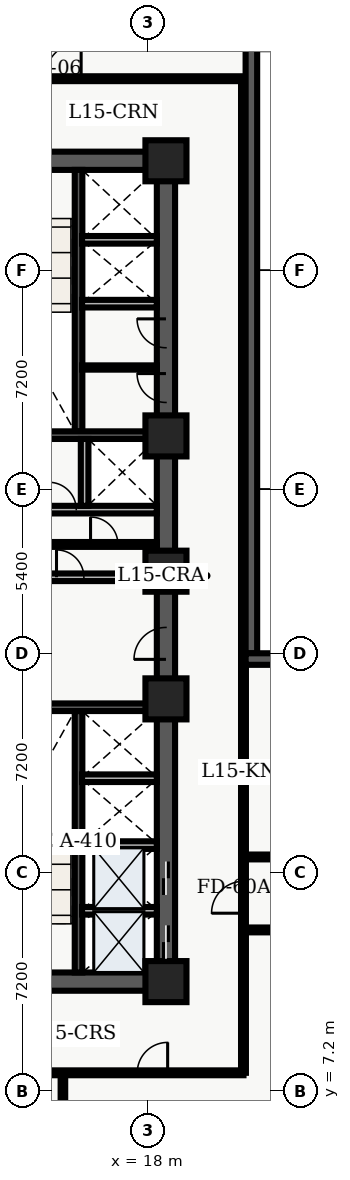
"""IFC4 building model, lengths in metres.
Left out: names, types, materials, properties, quantities, classifications, styles, units other than length and angle.
Written with IfcOpenShell. Run it as: python <this file> out.ifc"""

import sys

from ifc_helpers import new_model, entity, si_unit, converted_unit, direction, frame, origin_with_axes, origin_2d_with_axis, place, context, subcontext, project, spatial, polyline, rectangle, outline, extrude, element, fill, save


model = new_model("IFC4")
c1 = context("Model", 3, precision=1e-05, world=origin_with_axes(), true_north=direction((0.0, 1.0)))
c2 = subcontext(c1, "Body", "Model", "MODEL_VIEW")
j1 = project(units=[si_unit("LENGTHUNIT", "METRE"), converted_unit("PLANEANGLEUNIT", "DEGREE", entity("IfcPlaneAngleMeasure", 0.017), si_unit("PLANEANGLEUNIT", "RADIAN"), dimensions=[0, 0, 0, 0, 0, 0, 0])], contexts=[c1])
p1 = place(None, origin_with_axes())
s1 = spatial("IfcSite", under=j1, at=p1, CompositionType="ELEMENT")
p2 = place(p1, origin_with_axes())
s2 = spatial("IfcBuilding", under=s1, at=p2, CompositionType="ELEMENT")
p3 = place(p2, frame((0.0, 0.0, 63.9), z_axis=(0.0, 0.0, 1.0), x_axis=(1.0, 0.0, 0.0)))
s3 = spatial("IfcBuildingStorey", under=s2, at=p3, CompositionType="ELEMENT", Elevation=63.9)
p4 = place(p3, frame((11.4, 10.8, 0.0), z_axis=(0.0, 0.0, 1.0), x_axis=(1.0, 0.0, 0.0)))
e1 = element("IfcWall", 1, at=p4, inside=s3, PredefinedType="SHEAR", context=c2, shape_type="SweptSolid", body=[
    extrude(outline(polyline([(0.0, -0.3), (7.2, -0.3), (7.2, 0.3), (0.0, 0.3), (0.0, -0.3)])), origin_with_axes(), (0.0, 0.0, 1.0), 3.66),
])
p5 = place(p4, frame((2.625, 0.0, 0.0), z_axis=(0.0, 0.0, 1.0), x_axis=(1.0, 0.0, 0.0)))
e2 = element("IfcOpeningElement", 2, at=p5, cuts=e1, PredefinedType="OPENING", context=c2, shape_type="SweptSolid", body=[
    extrude(rectangle(XDim=1.05, YDim=0.62, at=origin_2d_with_axis()), origin_with_axes(), (0.0, 0.0, 1.0), 2.15),
])
p6 = place(p3, frame((11.4, 37.8, 0.0), z_axis=(0.0, 0.0, 1.0), x_axis=(1.0, 0.0, 0.0)))
e3 = element("IfcWall", 3, at=p6, inside=s3, PredefinedType="SHEAR", context=c2, shape_type="SweptSolid", body=[
    extrude(outline(polyline([(0.0, -0.3), (7.2, -0.3), (7.2, 0.3), (0.0, 0.3), (0.0, -0.3)])), origin_with_axes(), (0.0, 0.0, 1.0), 3.66),
])
p7 = place(p6, frame((2.625, 0.0, 0.0), z_axis=(0.0, 0.0, 1.0), x_axis=(1.0, 0.0, 0.0)))
e4 = element("IfcOpeningElement", 4, at=p7, cuts=e3, PredefinedType="OPENING", context=c2, shape_type="SweptSolid", body=[
    extrude(rectangle(XDim=1.05, YDim=0.62, at=origin_2d_with_axis()), origin_with_axes(), (0.0, 0.0, 1.0), 2.15),
])
p8 = place(p3, frame((18.6, 10.8, 0.0), z_axis=(0.0, 0.0, 1.0), x_axis=(0.0, 1.0, 0.0)))
e5 = element("IfcWall", 5, at=p8, inside=s3, PredefinedType="SHEAR", context=c2, shape_type="SweptSolid", body=[
    extrude(outline(polyline([(0.0, -0.3), (13.5, -0.3), (13.5, 0.3), (0.0, 0.3), (0.0, -0.3)])), origin_with_axes(), (0.0, 0.0, 1.0), 3.66),
])
p9 = place(p8, frame((1.3, 0.0, 0.0), z_axis=(0.0, 0.0, 1.0), x_axis=(1.0, 0.0, 0.0)))
e6 = element("IfcOpeningElement", 6, at=p9, cuts=e5, PredefinedType="OPENING", context=c2, shape_type="SweptSolid", body=[
    extrude(rectangle(XDim=1.1, YDim=0.62, at=origin_2d_with_axis()), origin_with_axes(), (0.0, 0.0, 1.0), 2.15),
])
p10 = place(p8, frame((3.4, 0.0, 0.0), z_axis=(0.0, 0.0, 1.0), x_axis=(1.0, 0.0, 0.0)))
e7 = element("IfcOpeningElement", 7, at=p10, cuts=e5, PredefinedType="OPENING", context=c2, shape_type="SweptSolid", body=[
    extrude(rectangle(XDim=1.1, YDim=0.62, at=origin_2d_with_axis()), origin_with_axes(), (0.0, 0.0, 1.0), 2.15),
])
p11 = place(p8, frame((11.125, 0.0, 0.0), z_axis=(0.0, 0.0, 1.0), x_axis=(1.0, 0.0, 0.0)))
e8 = element("IfcOpeningElement", 8, at=p11, cuts=e5, PredefinedType="OPENING", context=c2, shape_type="SweptSolid", body=[
    extrude(rectangle(XDim=1.05, YDim=0.62, at=origin_2d_with_axis()), origin_with_axes(), (0.0, 0.0, 1.0), 2.15),
])
p12 = place(p3, frame((18.6, 24.3, 0.0), z_axis=(0.0, 0.0, 1.0), x_axis=(0.0, 1.0, 0.0)))
e9 = element("IfcWall", 9, at=p12, inside=s3, PredefinedType="SHEAR", context=c2, shape_type="SweptSolid", body=[
    extrude(outline(polyline([(0.0, -0.3), (13.5, -0.3), (13.5, 0.3), (0.0, 0.3), (0.0, -0.3)])), origin_with_axes(), (0.0, 0.0, 1.0), 3.66),
])
p13 = place(p12, frame((6.025, 0.0, 0.0), z_axis=(0.0, 0.0, 1.0), x_axis=(1.0, 0.0, 0.0)))
e10 = element("IfcOpeningElement", 10, at=p13, cuts=e9, PredefinedType="OPENING", context=c2, shape_type="SweptSolid", body=[
    extrude(rectangle(XDim=0.95, YDim=0.62, at=origin_2d_with_axis()), origin_with_axes(), (0.0, 0.0, 1.0), 2.15),
])
p14 = place(p12, frame((7.825, 0.0, 0.0), z_axis=(0.0, 0.0, 1.0), x_axis=(1.0, 0.0, 0.0)))
e11 = element("IfcOpeningElement", 11, at=p14, cuts=e9, PredefinedType="OPENING", context=c2, shape_type="SweptSolid", body=[
    extrude(rectangle(XDim=0.95, YDim=0.62, at=origin_2d_with_axis()), origin_with_axes(), (0.0, 0.0, 1.0), 2.15),
])
p15 = place(p3, frame((15.725, 11.1, 0.0), z_axis=(0.0, 0.0, 1.0), x_axis=(0.0, 1.0, 0.0)))
e12 = element("IfcWall", 12, at=p15, inside=s3, PredefinedType="SHEAR", context=c2, shape_type="SweptSolid", body=[
    extrude(outline(polyline([(0.0, -0.125), (8.6, -0.125), (8.6, 0.125), (0.0, 0.125), (0.0, -0.125)])), origin_with_axes(), (0.0, 0.0, 1.0), 3.66),
])
p16 = place(p3, frame((11.7, 19.825, 0.0), z_axis=(0.0, 0.0, 1.0), x_axis=(1.0, 0.0, 0.0)))
e13 = element("IfcWall", 13, at=p16, inside=s3, PredefinedType="SHEAR", context=c2, shape_type="SweptSolid", body=[
    extrude(outline(polyline([(0.0, -0.125), (6.6, -0.125), (6.6, 0.125), (0.0, 0.125), (0.0, -0.125)])), origin_with_axes(), (0.0, 0.0, 1.0), 3.66),
])
p17 = place(p3, frame((15.725, 28.9, 0.0), z_axis=(0.0, 0.0, 1.0), x_axis=(0.0, 1.0, 0.0)))
e14 = element("IfcWall", 14, at=p17, inside=s3, PredefinedType="SHEAR", context=c2, shape_type="SweptSolid", body=[
    extrude(outline(polyline([(0.0, -0.125), (8.6, -0.125), (8.6, 0.125), (0.0, 0.125), (0.0, -0.125)])), origin_with_axes(), (0.0, 0.0, 1.0), 3.66),
])
p18 = place(p3, frame((11.7, 28.775, 0.0), z_axis=(0.0, 0.0, 1.0), x_axis=(1.0, 0.0, 0.0)))
e15 = element("IfcWall", 15, at=p18, inside=s3, PredefinedType="SHEAR", context=c2, shape_type="SweptSolid", body=[
    extrude(outline(polyline([(0.0, -0.125), (6.6, -0.125), (6.6, 0.125), (0.0, 0.125), (0.0, -0.125)])), origin_with_axes(), (0.0, 0.0, 1.0), 3.66),
])
p19 = place(p3, frame((11.7, 24.1, 0.0), z_axis=(0.0, 0.0, 1.0), x_axis=(1.0, 0.0, 0.0)))
e16 = element("IfcWall", 16, at=p19, inside=s3, PredefinedType="SOLIDWALL", context=c2, shape_type="SweptSolid", body=[
    extrude(outline(polyline([(0.0, -0.125), (6.6, -0.125), (6.6, 0.125), (0.0, 0.125), (0.0, -0.125)])), origin_with_axes(), (0.0, 0.0, 1.0), 2.7),
])
p20 = place(p19, frame((3.75, 0.0, 0.0), z_axis=(0.0, 0.0, 1.0), x_axis=(1.0, 0.0, 0.0)))
e17 = element("IfcOpeningElement", 17, at=p20, cuts=e16, PredefinedType="OPENING", context=c2, shape_type="SweptSolid", body=[
    extrude(rectangle(XDim=0.9, YDim=0.27, at=origin_2d_with_axis()), origin_with_axes(), (0.0, 0.0, 1.0), 2.15),
])
p21 = place(p3, frame((11.7, 26.325, 0.0), z_axis=(0.0, 0.0, 1.0), x_axis=(1.0, 0.0, 0.0)))
e18 = element("IfcWall", 18, at=p21, inside=s3, PredefinedType="SOLIDWALL", context=c2, shape_type="SweptSolid", body=[
    extrude(outline(polyline([(0.0, -0.125), (6.6, -0.125), (6.6, 0.125), (0.0, 0.125), (0.0, -0.125)])), origin_with_axes(), (0.0, 0.0, 1.0), 2.7),
])
p22 = place(p21, frame((3.5, 0.0, 0.0), z_axis=(0.0, 0.0, 1.0), x_axis=(1.0, 0.0, 0.0)))
e19 = element("IfcOpeningElement", 19, at=p22, cuts=e18, PredefinedType="OPENING", context=c2, shape_type="SweptSolid", body=[
    extrude(rectangle(XDim=0.9, YDim=0.27, at=origin_2d_with_axis()), origin_with_axes(), (0.0, 0.0, 1.0), 2.15),
])
p23 = place(p3, frame((15.925, 26.45, 0.0), z_axis=(0.0, 0.0, 1.0), x_axis=(0.0, 1.0, 0.0)))
e20 = element("IfcWall", 20, at=p23, inside=s3, PredefinedType="SOLIDWALL", context=c2, shape_type="SweptSolid", body=[
    extrude(outline(polyline([(0.0, -0.125), (2.2, -0.125), (2.2, 0.125), (0.0, 0.125), (0.0, -0.125)])), origin_with_axes(), (0.0, 0.0, 1.0), 2.7),
])
for number, where, z_axis, x_axis in (
    (21, (18.6, 10.8, 0.0), (0.0, 0.0, 1.0), (1.0, 0.0, 0.0)),
    (22, (18.6, 20.1, 0.0), (0.0, 0.0, 1.0), (1.0, 0.0, 0.0)),
    (23, (18.6, 24.3, 0.0), (0.0, 0.0, 1.0), (1.0, 0.0, 0.0)),
    (24, (18.6, 28.75, 0.0), (0.0, 0.0, 1.0), (1.0, 0.0, 0.0)),
    (25, (18.6, 37.8, 0.0), (0.0, 0.0, 1.0), (1.0, 0.0, 0.0)),
):
    element("IfcColumn", number, at=place(p3, frame(where, z_axis=z_axis, x_axis=x_axis)), inside=s3, PredefinedType="COLUMN", context=c2, shape_type="SweptSolid", body=[
        extrude(rectangle(XDim=1.35, YDim=1.35, at=origin_2d_with_axis()), origin_with_axes(), (0.0, 0.0, 1.0), 3.9),
    ])
p24 = place(p3, frame((14.62, 25.18, 0.0), z_axis=(0.0, 0.0, 1.0), x_axis=(1.0, 0.0, 0.0)))
e26 = element("IfcWall", 26, at=p24, inside=s3, PredefinedType="PARTITIONING", context=c2, shape_type="SweptSolid", body=[
    extrude(outline(polyline([(0.0, -0.08), (3.68, -0.08), (3.68, 0.08), (0.0, 0.08), (0.0, -0.08)])), origin_with_axes(), (0.0, 0.0, 1.0), 2.7),
])
p25 = place(p24, frame((1.95, 0.0, 0.0), z_axis=(0.0, 0.0, 1.0), x_axis=(1.0, 0.0, 0.0)))
e27 = element("IfcOpeningElement", 27, at=p25, cuts=e26, PredefinedType="OPENING", context=c2, shape_type="SweptSolid", body=[
    extrude(rectangle(XDim=0.9, YDim=0.18, at=origin_2d_with_axis()), origin_with_axes(), (0.0, 0.0, 1.0), 2.15),
])
for number, where, z_axis, x_axis in (
    (28, (15.84, 13.13, 0.0), (0.0, 0.0, 1.0), (1.0, 0.0, 0.0)),
    (29, (15.84, 15.29, 0.0), (0.0, 0.0, 1.0), (1.0, 0.0, 0.0)),
    (30, (15.84, 17.49, 0.0), (0.0, 0.0, 1.0), (1.0, 0.0, 0.0)),
    (31, (15.84, 33.1, 0.0), (0.0, 0.0, 1.0), (1.0, 0.0, 0.0)),
    (32, (15.84, 35.2, 0.0), (0.0, 0.0, 1.0), (1.0, 0.0, 0.0)),
):
    element("IfcWall", number, at=place(p3, frame(where, z_axis=z_axis, x_axis=x_axis)), inside=s3, PredefinedType="SOLIDWALL", context=c2, shape_type="SweptSolid", body=[
        extrude(outline(polyline([(0.0, -0.125), (2.46, -0.125), (2.46, 0.125), (0.0, 0.125), (0.0, -0.125)])), origin_with_axes(), (0.0, 0.0, 1.0), 2.7),
    ])
p26 = place(p3, frame((15.84, 31.0, 0.0), z_axis=(0.0, 0.0, 1.0), x_axis=(1.0, 0.0, 0.0)))
e33 = element("IfcWall", 33, at=p26, inside=s3, PredefinedType="PARTITIONING", context=c2, shape_type="SweptSolid", body=[
    extrude(outline(polyline([(0.0, -0.07), (2.46, -0.07), (2.46, 0.07), (0.0, 0.07), (0.0, -0.07)])), origin_with_axes(), (0.0, 0.0, 1.0), 2.7),
])
p27 = place(p3, frame((2.6, 7.8, 0.0), z_axis=(0.0, 0.0, 1.0), x_axis=(1.0, 0.0, 0.0)))
e34 = element("IfcWall", 34, at=p27, inside=s3, PredefinedType="PARTITIONING", context=c2, shape_type="SweptSolid", body=[
    extrude(outline(polyline([(0.0, -0.08), (18.55, -0.08), (18.55, 0.08), (0.0, 0.08), (0.0, -0.08)])), origin_with_axes(), (0.0, 0.0, 1.0), 2.7),
])
p28 = place(p27, frame((1.825, 0.0, 0.0), z_axis=(0.0, 0.0, 1.0), x_axis=(1.0, 0.0, 0.0)))
e35 = element("IfcOpeningElement", 35, at=p28, cuts=e34, PredefinedType="OPENING", context=c2, shape_type="SweptSolid", body=[
    extrude(rectangle(XDim=1.0, YDim=0.18, at=origin_2d_with_axis()), origin_with_axes(), (0.0, 0.0, 1.0), 2.15),
])
p29 = place(p27, frame((6.229, 0.0, 0.0), z_axis=(0.0, 0.0, 1.0), x_axis=(1.0, 0.0, 0.0)))
e36 = element("IfcOpeningElement", 36, at=p29, cuts=e34, PredefinedType="OPENING", context=c2, shape_type="SweptSolid", body=[
    extrude(rectangle(XDim=1.0, YDim=0.18, at=origin_2d_with_axis()), origin_with_axes(), (0.0, 0.0, 1.0), 2.15),
])
p30 = place(p27, frame((10.706, 0.0, 0.0), z_axis=(0.0, 0.0, 1.0), x_axis=(1.0, 0.0, 0.0)))
e37 = element("IfcOpeningElement", 37, at=p30, cuts=e34, PredefinedType="OPENING", context=c2, shape_type="SweptSolid", body=[
    extrude(rectangle(XDim=1.0, YDim=0.18, at=origin_2d_with_axis()), origin_with_axes(), (0.0, 0.0, 1.0), 2.15),
])
p31 = place(p27, frame((15.556, 0.0, 0.0), z_axis=(0.0, 0.0, 1.0), x_axis=(1.0, 0.0, 0.0)))
e38 = element("IfcOpeningElement", 38, at=p31, cuts=e34, PredefinedType="OPENING", context=c2, shape_type="SweptSolid", body=[
    extrude(rectangle(XDim=1.0, YDim=0.18, at=origin_2d_with_axis()), origin_with_axes(), (0.0, 0.0, 1.0), 2.15),
])
p32 = place(p3, frame((2.6, 40.5, 0.0), z_axis=(0.0, 0.0, 1.0), x_axis=(1.0, 0.0, 0.0)))
e39 = element("IfcWall", 39, at=p32, inside=s3, PredefinedType="PARTITIONING", context=c2, shape_type="SweptSolid", body=[
    extrude(outline(polyline([(0.0, -0.08), (18.65, -0.08), (18.65, 0.08), (0.0, 0.08), (0.0, -0.08)])), origin_with_axes(), (0.0, 0.0, 1.0), 2.7),
])
p33 = place(p32, frame((6.045, 0.0, 0.0), z_axis=(0.0, 0.0, 1.0), x_axis=(1.0, 0.0, 0.0)))
e40 = element("IfcOpeningElement", 40, at=p33, cuts=e39, PredefinedType="OPENING", context=c2, shape_type="SweptSolid", body=[
    extrude(rectangle(XDim=1.0, YDim=0.18, at=origin_2d_with_axis()), origin_with_axes(), (0.0, 0.0, 1.0), 2.15),
])
p34 = place(p32, frame((12.61, 0.0, 0.0), z_axis=(0.0, 0.0, 1.0), x_axis=(1.0, 0.0, 0.0)))
e41 = element("IfcOpeningElement", 41, at=p34, cuts=e39, PredefinedType="OPENING", context=c2, shape_type="SweptSolid", body=[
    extrude(rectangle(XDim=1.2, YDim=0.18, at=origin_2d_with_axis()), origin_with_axes(), (0.0, 0.0, 1.0), 2.2),
])
p35 = place(p3, frame((21.15, 7.8, 0.0), z_axis=(0.0, 0.0, 1.0), x_axis=(0.0, 1.0, 0.0)))
e42 = element("IfcWall", 42, at=p35, inside=s3, PredefinedType="PARTITIONING", context=c2, shape_type="SweptSolid", body=[
    extrude(outline(polyline([(0.0, -0.08), (32.7, -0.08), (32.7, 0.08), (0.0, 0.08), (0.0, -0.08)])), origin_with_axes(), (0.0, 0.0, 1.0), 2.7),
])
p36 = place(p35, frame((5.775, 0.0, 0.0), z_axis=(0.0, 0.0, 1.0), x_axis=(1.0, 0.0, 0.0)))
e43 = element("IfcOpeningElement", 43, at=p36, cuts=e42, PredefinedType="OPENING", context=c2, shape_type="SweptSolid", body=[
    extrude(rectangle(XDim=1.05, YDim=0.18, at=origin_2d_with_axis()), origin_with_axes(), (0.0, 0.0, 1.0), 2.15),
])
p37 = place(p3, frame((15.211, 0.36, 0.0), z_axis=(0.0, 0.0, 1.0), x_axis=(0.0, 1.0, 0.0)))
e44 = element("IfcWall", 44, at=p37, inside=s3, PredefinedType="PARTITIONING", context=c2, shape_type="SweptSolid", body=[
    extrude(outline(polyline([(0.0, -0.075), (7.34, -0.075), (7.34, 0.075), (0.0, 0.075), (0.0, -0.075)])), origin_with_axes(), (0.0, 0.0, 1.0), 2.7),
])
p38 = place(p3, frame((21.15, 12.5, 0.0), z_axis=(0.0, 0.0, 1.0), x_axis=(1.0, 0.0, 0.0)))
e45 = element("IfcWall", 45, at=p38, inside=s3, PredefinedType="PARTITIONING", context=c2, shape_type="SweptSolid", body=[
    extrude(outline(polyline([(0.0, -0.08), (15.2, -0.08), (15.2, 0.08), (0.0, 0.08), (0.0, -0.08)])), origin_with_axes(), (0.0, 0.0, 1.0), 2.7),
])
p39 = place(p38, frame((7.65, 0.0, 0.0), z_axis=(0.0, 0.0, 1.0), x_axis=(1.0, 0.0, 0.0)))
e46 = element("IfcOpeningElement", 46, at=p39, cuts=e45, PredefinedType="OPENING", context=c2, shape_type="SweptSolid", body=[
    extrude(rectangle(XDim=1.0, YDim=0.18, at=origin_2d_with_axis()), origin_with_axes(), (0.0, 0.0, 1.0), 2.15),
])
p40 = place(p3, frame((21.15, 14.9, 0.0), z_axis=(0.0, 0.0, 1.0), x_axis=(1.0, 0.0, 0.0)))
e47 = element("IfcWall", 47, at=p40, inside=s3, PredefinedType="PARTITIONING", context=c2, shape_type="SweptSolid", body=[
    extrude(outline(polyline([(0.0, -0.08), (15.2, -0.08), (15.2, 0.08), (0.0, 0.08), (0.0, -0.08)])), origin_with_axes(), (0.0, 0.0, 1.0), 2.7),
])
p41 = place(p40, frame((1.768, 0.0, 0.0), z_axis=(0.0, 0.0, 1.0), x_axis=(1.0, 0.0, 0.0)))
e48 = element("IfcOpeningElement", 48, at=p41, cuts=e47, PredefinedType="OPENING", context=c2, shape_type="SweptSolid", body=[
    extrude(rectangle(XDim=1.0, YDim=0.18, at=origin_2d_with_axis()), origin_with_axes(), (0.0, 0.0, 1.0), 2.15),
])
p42 = place(p40, frame((4.902, 0.0, 0.0), z_axis=(0.0, 0.0, 1.0), x_axis=(1.0, 0.0, 0.0)))
e49 = element("IfcOpeningElement", 49, at=p42, cuts=e47, PredefinedType="OPENING", context=c2, shape_type="SweptSolid", body=[
    extrude(rectangle(XDim=1.0, YDim=0.18, at=origin_2d_with_axis()), origin_with_axes(), (0.0, 0.0, 1.0), 2.15),
])
p43 = place(p40, frame((8.527, 0.0, 0.0), z_axis=(0.0, 0.0, 1.0), x_axis=(1.0, 0.0, 0.0)))
e50 = element("IfcOpeningElement", 50, at=p43, cuts=e47, PredefinedType="OPENING", context=c2, shape_type="SweptSolid", body=[
    extrude(rectangle(XDim=1.0, YDim=0.18, at=origin_2d_with_axis()), origin_with_axes(), (0.0, 0.0, 1.0), 2.15),
])
p44 = place(p40, frame((12.861, 0.0, 0.0), z_axis=(0.0, 0.0, 1.0), x_axis=(1.0, 0.0, 0.0)))
e51 = element("IfcOpeningElement", 51, at=p44, cuts=e47, PredefinedType="OPENING", context=c2, shape_type="SweptSolid", body=[
    extrude(rectangle(XDim=1.0, YDim=0.18, at=origin_2d_with_axis()), origin_with_axes(), (0.0, 0.0, 1.0), 2.15),
])
p45 = place(p3, frame((21.41, 45.82, 0.0), z_axis=(0.0, 0.0, 1.0), x_axis=(0.0, -1.0, 0.0)))
e52 = element("IfcWall", 52, at=p45, inside=s3, PredefinedType="SOLIDWALL", context=c2, shape_type="SweptSolid", body=[
    extrude(outline(polyline([(0.0, -0.19), (24.22, -0.19), (24.22, 0.19), (0.0, 0.19), (0.0, -0.19)])), origin_with_axes(), (0.0, 0.0, 1.0), 3.66),
])
p46 = place(p45, frame((2.902, 0.0, 0.45), z_axis=(0.0, 0.0, 1.0), x_axis=(1.0, 0.0, 0.0)))
e53 = element("IfcOpeningElement", 53, at=p46, cuts=e52, PredefinedType="OPENING", context=c2, shape_type="SweptSolid", body=[
    extrude(rectangle(XDim=2.1, YDim=0.4, at=origin_2d_with_axis()), origin_with_axes(), (0.0, 0.0, 1.0), 2.2),
])
p47 = place(p3, frame((21.22, 21.41, 0.0), z_axis=(0.0, 0.0, 1.0), x_axis=(1.0, 0.0, 0.0)))
e54 = element("IfcWall", 54, at=p47, inside=s3, PredefinedType="SOLIDWALL", context=c2, shape_type="SweptSolid", body=[
    extrude(outline(polyline([(0.0, -0.19), (17.18, -0.19), (17.18, 0.19), (0.0, 0.19), (0.0, -0.19)])), origin_with_axes(), (0.0, 0.0, 1.0), 3.66),
])
p48 = place(p47, frame((8.59, 0.0, 0.45), z_axis=(0.0, 0.0, 1.0), x_axis=(1.0, 0.0, 0.0)))
e55 = element("IfcOpeningElement", 55, at=p48, cuts=e54, PredefinedType="OPENING", context=c2, shape_type="SweptSolid", body=[
    extrude(rectangle(XDim=2.1, YDim=0.4, at=origin_2d_with_axis()), origin_with_axes(), (0.0, 0.0, 1.0), 2.2),
])
p49 = place(p47, frame((13.467, 0.0, 0.45), z_axis=(0.0, 0.0, 1.0), x_axis=(1.0, 0.0, 0.0)))
e56 = element("IfcOpeningElement", 56, at=p49, cuts=e54, PredefinedType="OPENING", context=c2, shape_type="SweptSolid", body=[
    extrude(rectangle(XDim=2.1, YDim=0.4, at=origin_2d_with_axis()), origin_with_axes(), (0.0, 0.0, 1.0), 2.2),
])
p50 = place(p8, frame((1.3, 0.0, 0.0), z_axis=(0.0, 0.0, 1.0), x_axis=(1.0, 0.0, 0.0)))
e57 = element("IfcDoor", 57, at=p50, inside=s3, OperationType="SLIDING_TO_LEFT", PredefinedType="DOOR", context=c2, shape_type="SweptSolid", body=[
    extrude(rectangle(XDim=1.1, YDim=0.09, at=origin_2d_with_axis()), origin_with_axes(), (0.0, 0.0, 1.0), 2.15),
])
fill(e6, e57)
p51 = place(p8, frame((3.4, 0.0, 0.0), z_axis=(0.0, 0.0, 1.0), x_axis=(1.0, 0.0, 0.0)))
e58 = element("IfcDoor", 58, at=p51, inside=s3, OperationType="SLIDING_TO_RIGHT", PredefinedType="DOOR", context=c2, shape_type="SweptSolid", body=[
    extrude(rectangle(XDim=1.1, YDim=0.09, at=origin_2d_with_axis()), origin_with_axes(), (0.0, 0.0, 1.0), 2.15),
])
fill(e7, e58)
p52 = place(p8, frame((11.125, 0.0, 0.0), z_axis=(0.0, 0.0, 1.0), x_axis=(1.0, 0.0, 0.0)))
e59 = element("IfcDoor", 59, at=p52, inside=s3, OperationType="SINGLE_SWING_LEFT", PredefinedType="DOOR", context=c2, shape_type="SweptSolid", body=[
    extrude(rectangle(XDim=1.05, YDim=0.09, at=origin_2d_with_axis()), origin_with_axes(), (0.0, 0.0, 1.0), 2.15),
])
fill(e8, e59)
p53 = place(p21, frame((3.5, 0.0, 0.0), z_axis=(0.0, 0.0, 1.0), x_axis=(1.0, 0.0, 0.0)))
e60 = element("IfcDoor", 60, at=p53, inside=s3, OperationType="SINGLE_SWING_LEFT", PredefinedType="DOOR", context=c2, shape_type="SweptSolid", body=[
    extrude(rectangle(XDim=0.9, YDim=0.09, at=origin_2d_with_axis()), origin_with_axes(), (0.0, 0.0, 1.0), 2.15),
])
fill(e19, e60)
p54 = place(p19, frame((3.75, 0.0, 0.0), z_axis=(0.0, 0.0, 1.0), x_axis=(1.0, 0.0, 0.0)))
e61 = element("IfcDoor", 61, at=p54, inside=s3, OperationType="SINGLE_SWING_LEFT", PredefinedType="DOOR", context=c2, shape_type="SweptSolid", body=[
    extrude(rectangle(XDim=0.9, YDim=0.09, at=origin_2d_with_axis()), origin_with_axes(), (0.0, 0.0, 1.0), 2.15),
])
fill(e17, e61)
p55 = place(p24, frame((1.95, 0.0, 0.0), z_axis=(0.0, 0.0, 1.0), x_axis=(1.0, 0.0, 0.0)))
e62 = element("IfcDoor", 62, at=p55, inside=s3, OperationType="SINGLE_SWING_LEFT", PredefinedType="DOOR", context=c2, shape_type="SweptSolid", body=[
    extrude(rectangle(XDim=0.9, YDim=0.09, at=origin_2d_with_axis()), origin_with_axes(), (0.0, 0.0, 1.0), 2.15),
])
fill(e27, e62)
p56 = place(p12, frame((6.025, 0.0, 0.0), z_axis=(0.0, 0.0, 1.0), x_axis=(1.0, 0.0, 0.0)))
e63 = element("IfcDoor", 63, at=p56, inside=s3, OperationType="SINGLE_SWING_RIGHT", PredefinedType="DOOR", context=c2, shape_type="SweptSolid", body=[
    extrude(rectangle(XDim=0.95, YDim=0.09, at=origin_2d_with_axis()), origin_with_axes(), (0.0, 0.0, 1.0), 2.15),
])
fill(e10, e63)
p57 = place(p12, frame((7.825, 0.0, 0.0), z_axis=(0.0, 0.0, 1.0), x_axis=(1.0, 0.0, 0.0)))
e64 = element("IfcDoor", 64, at=p57, inside=s3, OperationType="SINGLE_SWING_RIGHT", PredefinedType="DOOR", context=c2, shape_type="SweptSolid", body=[
    extrude(rectangle(XDim=0.95, YDim=0.09, at=origin_2d_with_axis()), origin_with_axes(), (0.0, 0.0, 1.0), 2.15),
])
fill(e11, e64)
p58 = place(p27, frame((15.556, 0.0, 0.0), z_axis=(0.0, 0.0, 1.0), x_axis=(1.0, 0.0, 0.0)))
e65 = element("IfcDoor", 65, at=p58, inside=s3, OperationType="SINGLE_SWING_RIGHT", PredefinedType="DOOR", context=c2, shape_type="SweptSolid", body=[
    extrude(rectangle(XDim=1.0, YDim=0.09, at=origin_2d_with_axis()), origin_with_axes(), (0.0, 0.0, 1.0), 2.15),
])
fill(e38, e65)
p59 = place(p32, frame((12.61, 0.0, 0.0), z_axis=(0.0, 0.0, 1.0), x_axis=(1.0, 0.0, 0.0)))
e66 = element("IfcDoor", 66, at=p59, inside=s3, OperationType="SINGLE_SWING_RIGHT", PredefinedType="DOOR", context=c2, shape_type="SweptSolid", body=[
    extrude(rectangle(XDim=1.2, YDim=0.09, at=origin_2d_with_axis()), origin_with_axes(), (0.0, 0.0, 1.0), 2.2),
])
fill(e41, e66)
p60 = place(p35, frame((5.775, 0.0, 0.0), z_axis=(0.0, 0.0, 1.0), x_axis=(1.0, 0.0, 0.0)))
e67 = element("IfcDoor", 67, at=p60, inside=s3, OperationType="SINGLE_SWING_LEFT", PredefinedType="DOOR", context=c2, shape_type="SweptSolid", body=[
    extrude(rectangle(XDim=1.05, YDim=0.09, at=origin_2d_with_axis()), origin_with_axes(), (0.0, 0.0, 1.0), 2.15),
])
fill(e43, e67)
save(model, sys.argv[1])
